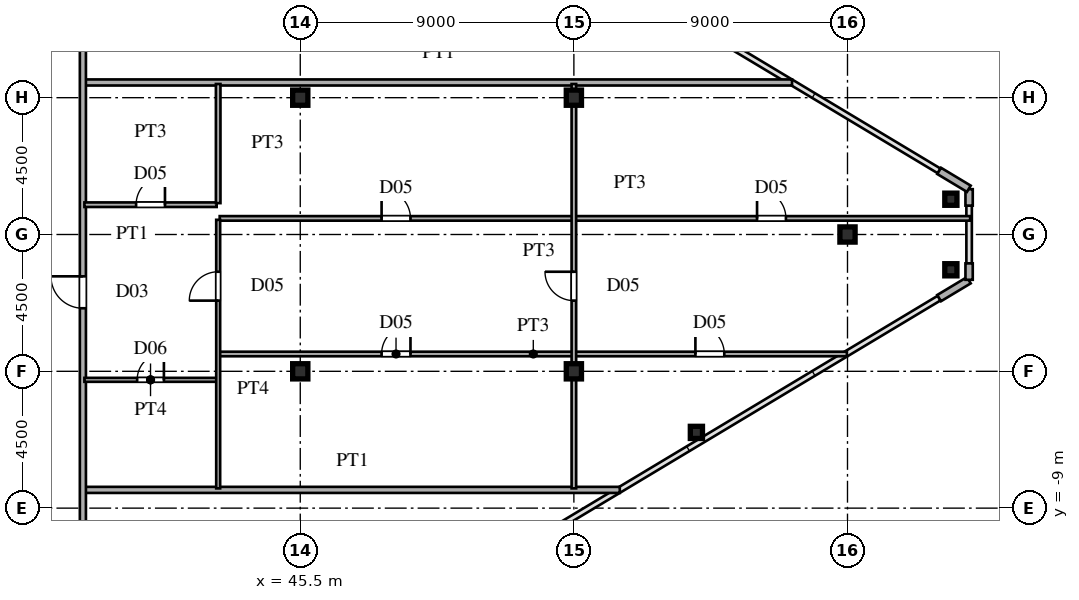
"""IFC4 building model, lengths in metres.
Left out: names, types, materials, properties, quantities, classifications, styles, units other than length and angle.
Written with IfcOpenShell. Run it as: python <this file> out.ifc"""

import sys

from ifc_helpers import new_model, si_unit, direction, frame, frame_2d, origin, origin_2d, place, context, subcontext, project, spatial, rectangle, hollow_rectangle, i_section, extrude, source, transform, mapped, element, fill, save


model = new_model("IFC4")
c1 = context("Model", 3, precision=1e-05, world=origin(), true_north=direction((0.0, 1.0)))
c2 = subcontext(c1, "Body", "Model", "MODEL_VIEW")
j1 = project(units=[si_unit("LENGTHUNIT", "METRE"), si_unit("PLANEANGLEUNIT", "RADIAN")], contexts=[c1])
p1 = place(None, origin())
s1 = spatial("IfcSite", under=j1, at=p1, CompositionType="ELEMENT")
p2 = place(p1, origin())
s2 = spatial("IfcBuilding", under=s1, at=p2, CompositionType="ELEMENT")
p3 = place(p2, frame((0.0, 0.0, 213.9)))
s3 = spatial("IfcBuildingStorey", under=s2, at=p3, CompositionType="ELEMENT", Elevation=213.9)
m1 = source(origin(), c2, "Body", "SweptSolid", [
    extrude(i_section(OverallWidth=0.5, OverallDepth=0.5, WebThickness=0.02, FlangeThickness=0.032, at=origin_2d()), origin(), (0.0, 0.0, 1.0), 3.6),
])
for number, where, z_axis, x_axis in (
    (1, (45.5, -4.5, 0.0), (0.0, 0.0, 1.0), (1.0, 0.0, 0.0)),
    (2, (45.5, 4.5, 0.0), (0.0, 0.0, 1.0), (1.0, 0.0, 0.0)),
    (3, (54.5, -4.5, 0.0), (0.0, 0.0, 1.0), (1.0, 0.0, 0.0)),
    (4, (54.5, 4.5, 0.0), (0.0, 0.0, 1.0), (1.0, 0.0, 0.0)),
    (5, (63.5, 0.0, 0.0), (0.0, 0.0, 1.0), (1.0, 0.0, 0.0)),
):
    element("IfcColumn", number, at=place(p3, frame(where, z_axis=z_axis, x_axis=x_axis)), inside=s3, PredefinedType="COLUMN", context=c2, shape_type="MappedRepresentation", body=[
        mapped(m1, transform((0.0, 0.0, 0.0), scale=1.0)),
    ])
m2 = source(origin(), c2, "Body", "SweptSolid", [
    extrude(hollow_rectangle(XDim=0.4, YDim=0.4, WallThickness=0.016, at=origin_2d()), origin(), (0.0, 0.0, 1.0), 3.6),
])
for number, where, z_axis, x_axis in (
    (6, (66.9, -1.16, 0.0), (0.0, 0.0, 1.0), (1.0, 0.0, 0.0)),
    (7, (66.9, 1.16, 0.0), (0.0, 0.0, 1.0), (1.0, 0.0, 0.0)),
    (8, (58.53, -6.509, 0.0), (0.0, 0.0, 1.0), (1.0, 0.0, 0.0)),
):
    element("IfcColumn", number, at=place(p3, frame(where, z_axis=z_axis, x_axis=x_axis)), inside=s3, PredefinedType="COLUMN", context=c2, shape_type="MappedRepresentation", body=[
        mapped(m2, transform((0.0, 0.0, 0.0), scale=1.0)),
    ])
p4 = place(p3, frame((66.514, -2.092, 0.0), z_axis=(0.0, 0.0, 1.0), x_axis=(0.85743623509, 0.514590228002, 0.0)))
e9 = element("IfcWall", 9, at=p4, inside=s3, PredefinedType="SOLIDWALL", context=c2, shape_type="SweptSolid", body=[
    extrude(rectangle(XDim=1.14, YDim=0.24, at=frame_2d((0.57, 0.0))), origin(), (0.0, 0.0, 1.0), 3.38),
])
for number, where, z_axis, x_axis in (
    (10, (67.5, -1.49, 0.0), (0.0, 0.0, 1.0), (0.0, 1.0, 0.0)),
    (11, (67.5, 0.95, 0.0), (0.0, 0.0, 1.0), (0.0, 1.0, 0.0)),
):
    element("IfcWall", number, at=place(p3, frame(where, z_axis=z_axis, x_axis=x_axis)), inside=s3, PredefinedType="SOLIDWALL", context=c2, shape_type="SweptSolid", body=[
        extrude(rectangle(XDim=0.54, YDim=0.24, at=frame_2d((0.27, 0.0))), origin(), (0.0, 0.0, 1.0), 3.38),
    ])
p5 = place(p3, frame((67.491, 1.505, 0.0), z_axis=(0.0, 0.0, 1.0), x_axis=(-0.85743623509, 0.514590228002, 0.0)))
e12 = element("IfcWall", 12, at=p5, inside=s3, PredefinedType="SOLIDWALL", context=c2, shape_type="SweptSolid", body=[
    extrude(rectangle(XDim=1.14, YDim=0.24, at=frame_2d((0.57, 0.0))), origin(), (0.0, 0.0, 1.0), 3.38),
])
p6 = place(p3, frame((38.43, -8.4, 0.0), z_axis=(0.0, 0.0, 1.0), x_axis=(1.0, 0.0, 0.0)))
e13 = element("IfcWall", 13, at=p6, inside=s3, PredefinedType="PARTITIONING", context=c2, shape_type="SweptSolid", body=[
    extrude(rectangle(XDim=17.58, YDim=0.2, at=frame_2d((8.79, 0.0))), origin(), (0.0, 0.0, 1.0), 3.38),
])
p7 = place(p3, frame((38.4, -4.78, 0.0), z_axis=(0.0, 0.0, 1.0), x_axis=(1.0, 0.0, 0.0)))
e14 = element("IfcWall", 14, at=p7, inside=s3, PredefinedType="PARTITIONING", context=c2, shape_type="SweptSolid", body=[
    extrude(rectangle(XDim=4.35, YDim=0.13, at=frame_2d((2.175, 0.0))), origin(), (0.0, 0.0, 1.0), 3.38),
])
p8 = place(p7, frame((1.735, 0.0, 0.0)))
e15 = element("IfcOpeningElement", 15, at=p8, cuts=e14, PredefinedType="OPENING", context=c2, shape_type="SweptSolid", body=[
    extrude(rectangle(XDim=0.88, YDim=2.1, at=frame_2d((0.44, 1.05))), frame((0.0, 0.075, 0.0), z_axis=(0.0, -1.0, 0.0), x_axis=(1.0, 0.0, 0.0)), (0.0, 0.0, 1.0), 0.15),
])
p9 = place(p3, frame((42.85, -3.93, 0.0), z_axis=(0.0, 0.0, 1.0), x_axis=(1.0, 0.0, 0.0)))
e16 = element("IfcWall", 16, at=p9, inside=s3, PredefinedType="PARTITIONING", context=c2, shape_type="SweptSolid", body=[
    extrude(rectangle(XDim=20.63, YDim=0.15, at=frame_2d((10.315, 0.0))), origin(), (0.0, 0.0, 1.0), 3.38),
])
p10 = place(p9, frame((5.325, 0.0, 0.0)))
e17 = element("IfcOpeningElement", 17, at=p10, cuts=e16, PredefinedType="OPENING", context=c2, shape_type="SweptSolid", body=[
    extrude(rectangle(XDim=0.95, YDim=2.15, at=frame_2d((0.475, 1.075))), frame((0.0, 0.085, 0.0), z_axis=(0.0, -1.0, 0.0), x_axis=(1.0, 0.0, 0.0)), (0.0, 0.0, 1.0), 0.17),
])
p11 = place(p9, frame((15.647, 0.0, 0.0)))
e18 = element("IfcOpeningElement", 18, at=p11, cuts=e16, PredefinedType="OPENING", context=c2, shape_type="SweptSolid", body=[
    extrude(rectangle(XDim=0.95, YDim=2.15, at=frame_2d((0.475, 1.075))), frame((0.0, 0.085, 0.0), z_axis=(0.0, -1.0, 0.0), x_axis=(1.0, 0.0, 0.0)), (0.0, 0.0, 1.0), 0.17),
])
p12 = place(p3, frame((42.85, 0.53, 0.0), z_axis=(0.0, 0.0, 1.0), x_axis=(1.0, 0.0, 0.0)))
e19 = element("IfcWall", 19, at=p12, inside=s3, PredefinedType="PARTITIONING", context=c2, shape_type="SweptSolid", body=[
    extrude(rectangle(XDim=24.685, YDim=0.15, at=frame_2d((12.342, 0.0))), origin(), (0.0, 0.0, 1.0), 3.38),
])
p13 = place(p12, frame((5.325, 0.0, 0.0)))
e20 = element("IfcOpeningElement", 20, at=p13, cuts=e19, PredefinedType="OPENING", context=c2, shape_type="SweptSolid", body=[
    extrude(rectangle(XDim=0.95, YDim=2.15, at=frame_2d((0.475, 1.075))), frame((0.0, 0.085, 0.0), z_axis=(0.0, -1.0, 0.0), x_axis=(1.0, 0.0, 0.0)), (0.0, 0.0, 1.0), 0.17),
])
p14 = place(p12, frame((17.675, 0.0, 0.0)))
e21 = element("IfcOpeningElement", 21, at=p14, cuts=e19, PredefinedType="OPENING", context=c2, shape_type="SweptSolid", body=[
    extrude(rectangle(XDim=0.95, YDim=2.15, at=frame_2d((0.475, 1.075))), frame((0.0, 0.085, 0.0), z_axis=(0.0, -1.0, 0.0), x_axis=(1.0, 0.0, 0.0)), (0.0, 0.0, 1.0), 0.17),
])
p15 = place(p3, frame((38.4, 0.98, 0.0), z_axis=(0.0, 0.0, 1.0), x_axis=(1.0, 0.0, 0.0)))
e22 = element("IfcWall", 22, at=p15, inside=s3, PredefinedType="PARTITIONING", context=c2, shape_type="SweptSolid", body=[
    extrude(rectangle(XDim=4.35, YDim=0.15, at=frame_2d((2.175, 0.0))), origin(), (0.0, 0.0, 1.0), 3.38),
])
p16 = place(p15, frame((1.7, 0.0, 0.0)))
e23 = element("IfcOpeningElement", 23, at=p16, cuts=e22, PredefinedType="OPENING", context=c2, shape_type="SweptSolid", body=[
    extrude(rectangle(XDim=0.95, YDim=2.15, at=frame_2d((0.475, 1.075))), frame((0.0, 0.085, 0.0), z_axis=(0.0, -1.0, 0.0), x_axis=(1.0, 0.0, 0.0)), (0.0, 0.0, 1.0), 0.17),
])
p17 = place(p3, frame((38.43, 5.0, 0.0), z_axis=(0.0, 0.0, 1.0), x_axis=(1.0, 0.0, 0.0)))
e24 = element("IfcWall", 24, at=p17, inside=s3, PredefinedType="PARTITIONING", context=c2, shape_type="SweptSolid", body=[
    extrude(rectangle(XDim=23.246, YDim=0.2, at=frame_2d((11.623, 0.0))), origin(), (0.0, 0.0, 1.0), 3.38),
])
p18 = place(p3, frame((38.35, -15.715, 0.0), z_axis=(0.0, 0.0, 1.0), x_axis=(0.0, 1.0, 0.0)))
e25 = element("IfcWall", 25, at=p18, inside=s3, PredefinedType="PARTITIONING", context=c2, shape_type="SweptSolid", body=[
    extrude(rectangle(XDim=31.43, YDim=0.2, at=frame_2d((15.715, 0.0))), origin(), (0.0, 0.0, 1.0), 3.38),
])
p19 = place(p18, frame((3.09, 0.0, 0.0)))
e26 = element("IfcOpeningElement", 26, at=p19, cuts=e25, PredefinedType="OPENING", context=c2, shape_type="SweptSolid", body=[
    extrude(rectangle(XDim=1.05, YDim=2.25, at=frame_2d((0.525, 1.125))), frame((0.0, 0.11, 0.0), z_axis=(0.0, -1.0, 0.0), x_axis=(1.0, 0.0, 0.0)), (0.0, 0.0, 1.0), 0.22),
])
p20 = place(p18, frame((13.289, 0.0, 0.0)))
e27 = element("IfcOpeningElement", 27, at=p20, cuts=e25, PredefinedType="OPENING", context=c2, shape_type="SweptSolid", body=[
    extrude(rectangle(XDim=1.05, YDim=2.25, at=frame_2d((0.525, 1.125))), frame((0.0, 0.11, 0.0), z_axis=(0.0, -1.0, 0.0), x_axis=(1.0, 0.0, 0.0)), (0.0, 0.0, 1.0), 0.22),
])
p21 = place(p18, frame((25.59, 0.0, 0.0)))
e28 = element("IfcOpeningElement", 28, at=p21, cuts=e25, PredefinedType="OPENING", context=c2, shape_type="SweptSolid", body=[
    extrude(rectangle(XDim=1.05, YDim=2.25, at=frame_2d((0.525, 1.125))), frame((0.0, 0.11, 0.0), z_axis=(0.0, -1.0, 0.0), x_axis=(1.0, 0.0, 0.0)), (0.0, 0.0, 1.0), 0.22),
])
p22 = place(p3, frame((42.8, -8.35, 0.0), z_axis=(0.0, 0.0, 1.0), x_axis=(0.0, 1.0, 0.0)))
e29 = element("IfcWall", 29, at=p22, inside=s3, PredefinedType="PARTITIONING", context=c2, shape_type="SweptSolid", body=[
    extrude(rectangle(XDim=8.833, YDim=0.13, at=frame_2d((4.417, 0.0))), origin(), (0.0, 0.0, 1.0), 3.38),
])
p23 = place(p22, frame((6.175, 0.0, 0.0)))
e30 = element("IfcOpeningElement", 30, at=p23, cuts=e29, PredefinedType="OPENING", context=c2, shape_type="SweptSolid", body=[
    extrude(rectangle(XDim=0.95, YDim=2.15, at=frame_2d((0.475, 1.075))), frame((0.0, 0.075, 0.0), z_axis=(0.0, -1.0, 0.0), x_axis=(1.0, 0.0, 0.0)), (0.0, 0.0, 1.0), 0.15),
])
p24 = place(p3, frame((42.8, 1.032, 0.0), z_axis=(0.0, 0.0, 1.0), x_axis=(0.0, 1.0, 0.0)))
e31 = element("IfcWall", 31, at=p24, inside=s3, PredefinedType="PARTITIONING", context=c2, shape_type="SweptSolid", body=[
    extrude(rectangle(XDim=3.918, YDim=0.15, at=frame_2d((1.959, 0.0))), origin(), (0.0, 0.0, 1.0), 3.38),
])
p25 = place(p3, frame((54.5, -8.35, 0.0), z_axis=(0.0, 0.0, 1.0), x_axis=(0.0, 1.0, 0.0)))
e32 = element("IfcWall", 32, at=p25, inside=s3, PredefinedType="PARTITIONING", context=c2, shape_type="SweptSolid", body=[
    extrude(rectangle(XDim=13.3, YDim=0.15, at=frame_2d((6.65, 0.0))), origin(), (0.0, 0.0, 1.0), 2.78),
])
p26 = place(p25, frame((6.175, 0.0, 0.0)))
e33 = element("IfcOpeningElement", 33, at=p26, cuts=e32, PredefinedType="OPENING", context=c2, shape_type="SweptSolid", body=[
    extrude(rectangle(XDim=0.95, YDim=2.15, at=frame_2d((0.475, 1.075))), frame((0.0, 0.085, 0.0), z_axis=(0.0, -1.0, 0.0), x_axis=(1.0, 0.0, 0.0)), (0.0, 0.0, 1.0), 0.17),
])
m3 = source(origin(), c2, "Body", "SweptSolid", [
    extrude(rectangle(XDim=0.88, YDim=2.1, at=frame_2d((0.44, 1.05))), frame((0.0, 0.025, 0.0), z_axis=(0.0, -1.0, 0.0), x_axis=(1.0, 0.0, 0.0)), (0.0, 0.0, 1.0), 0.05),
])
p27 = place(p8, origin())
e34 = element("IfcDoor", 34, at=p27, inside=s3, OperationType="SINGLE_SWING_RIGHT", PredefinedType="DOOR", context=c2, shape_type="MappedRepresentation", body=[
    mapped(m3, transform((0.0, 0.0, 0.0), scale=1.0)),
])
fill(e15, e34)
m4 = source(origin(), c2, "Body", "SweptSolid", [
    extrude(rectangle(XDim=0.95, YDim=2.15, at=frame_2d((0.475, 1.075))), frame((0.0, 0.025, 0.0), z_axis=(0.0, -1.0, 0.0), x_axis=(1.0, 0.0, 0.0)), (0.0, 0.0, 1.0), 0.05),
])
p28 = place(p10, origin())
e35 = element("IfcDoor", 35, at=p28, inside=s3, OperationType="SINGLE_SWING_RIGHT", PredefinedType="DOOR", context=c2, shape_type="MappedRepresentation", body=[
    mapped(m4, transform((0.0, 0.0, 0.0), scale=1.0)),
])
fill(e17, e35)
p29 = place(p11, origin())
e36 = element("IfcDoor", 36, at=p29, inside=s3, OperationType="SINGLE_SWING_LEFT", PredefinedType="DOOR", context=c2, shape_type="MappedRepresentation", body=[
    mapped(m4, transform((0.0, 0.0, 0.0), scale=1.0)),
])
fill(e18, e36)
p30 = place(p13, origin())
e37 = element("IfcDoor", 37, at=p30, inside=s3, OperationType="SINGLE_SWING_LEFT", PredefinedType="DOOR", context=c2, shape_type="MappedRepresentation", body=[
    mapped(m4, transform((0.0, 0.0, 0.0), scale=1.0)),
])
fill(e20, e37)
p31 = place(p14, origin())
e38 = element("IfcDoor", 38, at=p31, inside=s3, OperationType="SINGLE_SWING_LEFT", PredefinedType="DOOR", context=c2, shape_type="MappedRepresentation", body=[
    mapped(m4, transform((0.0, 0.0, 0.0), scale=1.0)),
])
fill(e21, e38)
p32 = place(p16, origin())
e39 = element("IfcDoor", 39, at=p32, inside=s3, OperationType="SINGLE_SWING_RIGHT", PredefinedType="DOOR", context=c2, shape_type="MappedRepresentation", body=[
    mapped(m4, transform((0.0, 0.0, 0.0), scale=1.0)),
])
fill(e23, e39)
m5 = source(origin(), c2, "Body", "SweptSolid", [
    extrude(rectangle(XDim=1.05, YDim=2.25, at=frame_2d((0.525, 1.125))), frame((0.0, 0.025, 0.0), z_axis=(0.0, -1.0, 0.0), x_axis=(1.0, 0.0, 0.0)), (0.0, 0.0, 1.0), 0.05),
])
p33 = place(p20, origin())
e40 = element("IfcDoor", 40, at=p33, inside=s3, OperationType="SINGLE_SWING_RIGHT", PredefinedType="DOOR", context=c2, shape_type="MappedRepresentation", body=[
    mapped(m5, transform((0.0, 0.0, 0.0), scale=1.0)),
])
fill(e27, e40)
p34 = place(p23, origin())
e41 = element("IfcDoor", 41, at=p34, inside=s3, OperationType="SINGLE_SWING_LEFT", PredefinedType="DOOR", context=c2, shape_type="MappedRepresentation", body=[
    mapped(m4, transform((0.0, 0.0, 0.0), scale=1.0)),
])
fill(e30, e41)
p35 = place(p26, origin())
e42 = element("IfcDoor", 42, at=p35, inside=s3, OperationType="SINGLE_SWING_RIGHT", PredefinedType="DOOR", context=c2, shape_type="MappedRepresentation", body=[
    mapped(m4, transform((0.0, 0.0, 0.0), scale=1.0)),
])
fill(e33, e42)
save(model, sys.argv[1])
